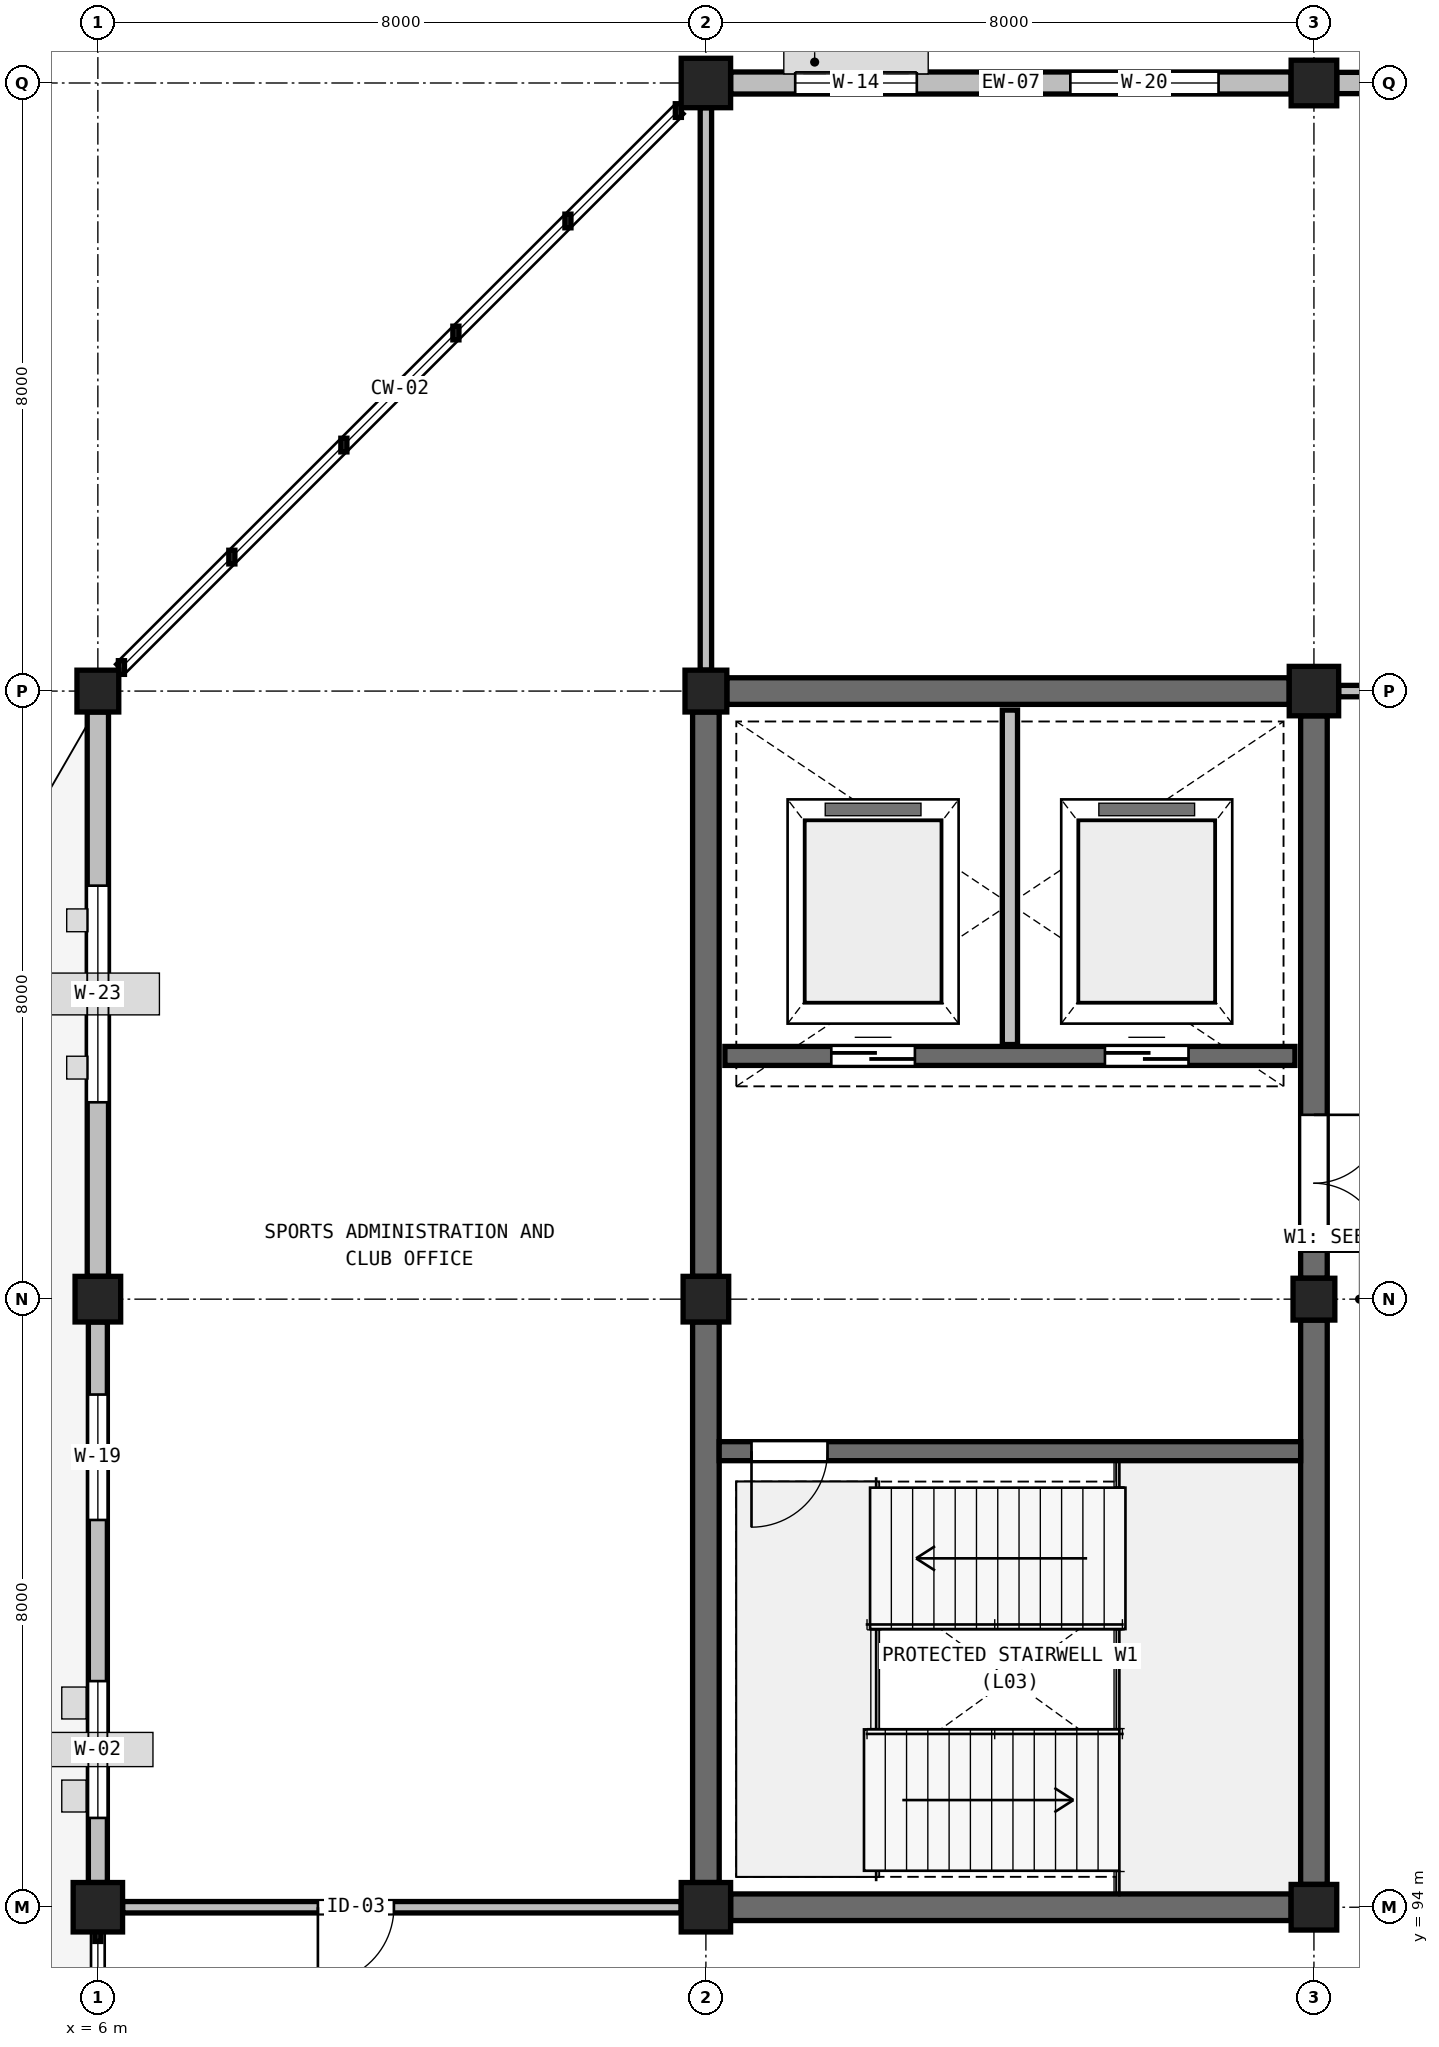
"""IFC4 building model, lengths in metres.
Left out: names, types, materials, properties, quantities, classifications, styles, units other than length and angle.
Written with IfcOpenShell. Run it as: python <this file> out.ifc"""

import sys

from ifc_helpers import new_model, si_unit, direction, frame, frame_2d, origin, origin_2d, place, context, subcontext, project, spatial, rectangle, extrude, element, fill, save


model = new_model("IFC4")
c1 = context("Model", 3, precision=1e-05, world=origin(), true_north=direction((0.0, 1.0)))
c2 = subcontext(c1, "Body", "Model", "MODEL_VIEW")
j1 = project(units=[si_unit("LENGTHUNIT", "METRE"), si_unit("PLANEANGLEUNIT", "RADIAN")], contexts=[c1])
p1 = place(None, origin())
s1 = spatial("IfcSite", under=j1, at=p1, CompositionType="ELEMENT")
p2 = place(p1, origin())
s2 = spatial("IfcBuilding", under=s1, at=p2, CompositionType="ELEMENT")
p3 = place(p2, frame((0.0, 0.0, 15.0)))
s3 = spatial("IfcBuildingStorey", under=s2, at=p3, CompositionType="ELEMENT", Elevation=15.0)
p4 = place(p3, frame((6.0, 94.0, 0.0), z_axis=(0.0, 0.0, 1.0), x_axis=(1.0, 0.0, 0.0)))
e1 = element("IfcColumn", 1, at=p4, inside=s3, PredefinedType="COLUMN", context=c2, shape_type="SweptSolid", body=[
    extrude(rectangle(XDim=0.65, YDim=0.65, at=origin_2d()), origin(), (0.0, 0.0, 1.0), 4.2),
])
p5 = place(p3, frame((6.0, 102.0, 0.0), z_axis=(0.0, 0.0, 1.0), x_axis=(1.0, 0.0, 0.0)))
e2 = element("IfcColumn", 2, at=p5, inside=s3, PredefinedType="COLUMN", context=c2, shape_type="SweptSolid", body=[
    extrude(rectangle(XDim=0.6, YDim=0.6, at=origin_2d()), origin(), (0.0, 0.0, 1.0), 4.2),
])
p6 = place(p3, frame((6.0, 110.0, 0.0), z_axis=(0.0, 0.0, 1.0), x_axis=(1.0, 0.0, 0.0)))
e3 = element("IfcColumn", 3, at=p6, inside=s3, PredefinedType="COLUMN", context=c2, shape_type="SweptSolid", body=[
    extrude(rectangle(XDim=0.55, YDim=0.55, at=origin_2d()), origin(), (0.0, 0.0, 1.0), 4.2),
])
p7 = place(p3, frame((14.0, 94.0, 0.0), z_axis=(0.0, 0.0, 1.0), x_axis=(1.0, 0.0, 0.0)))
e4 = element("IfcColumn", 4, at=p7, inside=s3, PredefinedType="COLUMN", context=c2, shape_type="SweptSolid", body=[
    extrude(rectangle(XDim=0.65, YDim=0.65, at=origin_2d()), origin(), (0.0, 0.0, 1.0), 4.2),
])
p8 = place(p3, frame((14.0, 102.0, 0.0), z_axis=(0.0, 0.0, 1.0), x_axis=(1.0, 0.0, 0.0)))
e5 = element("IfcColumn", 5, at=p8, inside=s3, PredefinedType="COLUMN", context=c2, shape_type="SweptSolid", body=[
    extrude(rectangle(XDim=0.6, YDim=0.6, at=origin_2d()), origin(), (0.0, 0.0, 1.0), 4.2),
])
p9 = place(p3, frame((14.0, 110.0, 0.0), z_axis=(0.0, 0.0, 1.0), x_axis=(1.0, 0.0, 0.0)))
e6 = element("IfcColumn", 6, at=p9, inside=s3, PredefinedType="COLUMN", context=c2, shape_type="SweptSolid", body=[
    extrude(rectangle(XDim=0.55, YDim=0.55, at=origin_2d()), origin(), (0.0, 0.0, 1.0), 4.2),
])
p10 = place(p3, frame((14.0, 118.0, 0.0), z_axis=(0.0, 0.0, 1.0), x_axis=(1.0, 0.0, 0.0)))
e7 = element("IfcColumn", 7, at=p10, inside=s3, PredefinedType="COLUMN", context=c2, shape_type="SweptSolid", body=[
    extrude(rectangle(XDim=0.65, YDim=0.65, at=origin_2d()), origin(), (0.0, 0.0, 1.0), 4.2),
])
p11 = place(p3, frame((22.0, 94.0, 0.0), z_axis=(0.0, 0.0, 1.0), x_axis=(1.0, 0.0, 0.0)))
e8 = element("IfcColumn", 8, at=p11, inside=s3, PredefinedType="COLUMN", context=c2, shape_type="SweptSolid", body=[
    extrude(rectangle(XDim=0.6, YDim=0.6, at=origin_2d()), origin(), (0.0, 0.0, 1.0), 4.2),
])
p12 = place(p3, frame((22.0, 102.0, 0.0), z_axis=(0.0, 0.0, 1.0), x_axis=(1.0, 0.0, 0.0)))
e9 = element("IfcColumn", 9, at=p12, inside=s3, PredefinedType="COLUMN", context=c2, shape_type="SweptSolid", body=[
    extrude(rectangle(XDim=0.55, YDim=0.55, at=origin_2d()), origin(), (0.0, 0.0, 1.0), 4.2),
])
p13 = place(p3, frame((22.0, 110.0, 0.0), z_axis=(0.0, 0.0, 1.0), x_axis=(1.0, 0.0, 0.0)))
e10 = element("IfcColumn", 10, at=p13, inside=s3, PredefinedType="COLUMN", context=c2, shape_type="SweptSolid", body=[
    extrude(rectangle(XDim=0.65, YDim=0.65, at=origin_2d()), origin(), (0.0, 0.0, 1.0), 4.2),
])
p14 = place(p3, frame((22.0, 118.0, 0.0), z_axis=(0.0, 0.0, 1.0), x_axis=(1.0, 0.0, 0.0)))
e11 = element("IfcColumn", 11, at=p14, inside=s3, PredefinedType="COLUMN", context=c2, shape_type="SweptSolid", body=[
    extrude(rectangle(XDim=0.6, YDim=0.6, at=origin_2d()), origin(), (0.0, 0.0, 1.0), 4.2),
])
p15 = place(p3, frame((14.325, 118.0, 0.0), z_axis=(0.0, 0.0, 1.0), x_axis=(1.0, 0.0, 0.0)))
e12 = element("IfcWall", 12, at=p15, inside=s3, PredefinedType="SOLIDWALL", context=c2, shape_type="SweptSolid", body=[
    extrude(rectangle(XDim=7.375, YDim=0.29, at=frame_2d((3.688, 0.0))), origin(), (0.0, 0.0, 1.0), 3.13),
])
p16 = place(p15, frame((0.85, 0.0, 0.55)))
e13 = element("IfcOpeningElement", 13, at=p16, cuts=e12, PredefinedType="OPENING", context=c2, shape_type="SweptSolid", body=[
    extrude(rectangle(XDim=1.6, YDim=2.0, at=frame_2d((0.8, 1.0))), frame((0.0, 0.155, 0.0), z_axis=(0.0, -1.0, 0.0), x_axis=(1.0, 0.0, 0.0)), (0.0, 0.0, 1.0), 0.31),
])
p17 = place(p15, frame((4.47, 0.0, 0.7)))
e14 = element("IfcOpeningElement", 14, at=p17, cuts=e12, PredefinedType="OPENING", context=c2, shape_type="SweptSolid", body=[
    extrude(rectangle(XDim=1.95, YDim=1.85, at=frame_2d((0.975, 0.925))), frame((0.0, 0.155, 0.0), z_axis=(0.0, -1.0, 0.0), x_axis=(1.0, 0.0, 0.0)), (0.0, 0.0, 1.0), 0.31),
])
p18 = place(p3, frame((22.3, 118.0, 0.0), z_axis=(0.0, 0.0, 1.0), x_axis=(1.0, 0.0, 0.0)))
e15 = element("IfcWall", 15, at=p18, inside=s3, PredefinedType="SOLIDWALL", context=c2, shape_type="SweptSolid", body=[
    extrude(rectangle(XDim=7.425, YDim=0.28, at=frame_2d((3.712, 0.0))), origin(), (0.0, 0.0, 1.0), 3.08),
])
p19 = place(p18, frame((1.31, 0.0, 1.15)))
e16 = element("IfcOpeningElement", 16, at=p19, cuts=e15, PredefinedType="OPENING", context=c2, shape_type="SweptSolid", body=[
    extrude(rectangle(XDim=4.8, YDim=1.4, at=frame_2d((2.4, 0.7))), frame((0.0, 0.15, 0.0), z_axis=(0.0, -1.0, 0.0), x_axis=(1.0, 0.0, 0.0)), (0.0, 0.0, 1.0), 0.3),
])
p20 = place(p3, frame((6.0, 94.325, 0.0), z_axis=(0.0, 0.0, 1.0), x_axis=(0.0, 1.0, 0.0)))
e17 = element("IfcWall", 17, at=p20, inside=s3, PredefinedType="SOLIDWALL", context=c2, shape_type="SweptSolid", body=[
    extrude(rectangle(XDim=7.375, YDim=0.25, at=frame_2d((3.688, 0.0))), origin(), (0.0, 0.0, 1.0), 3.38),
])
p21 = place(p20, frame((0.85, 0.0, 0.75)))
e18 = element("IfcOpeningElement", 18, at=p21, cuts=e17, PredefinedType="OPENING", context=c2, shape_type="SweptSolid", body=[
    extrude(rectangle(XDim=1.8, YDim=1.8, at=frame_2d((0.9, 0.9))), frame((0.0, 0.135, 0.0), z_axis=(0.0, -1.0, 0.0), x_axis=(1.0, 0.0, 0.0)), (0.0, 0.0, 1.0), 0.27),
])
p22 = place(p20, frame((4.77, 0.0, 0.7)))
e19 = element("IfcOpeningElement", 19, at=p22, cuts=e17, PredefinedType="OPENING", context=c2, shape_type="SweptSolid", body=[
    extrude(rectangle(XDim=1.65, YDim=1.85, at=frame_2d((0.825, 0.925))), frame((0.0, 0.135, 0.0), z_axis=(0.0, -1.0, 0.0), x_axis=(1.0, 0.0, 0.0)), (0.0, 0.0, 1.0), 0.27),
])
p23 = place(p3, frame((6.0, 102.3, 0.0), z_axis=(0.0, 0.0, 1.0), x_axis=(0.0, 1.0, 0.0)))
e20 = element("IfcWall", 20, at=p23, inside=s3, PredefinedType="SOLIDWALL", context=c2, shape_type="SweptSolid", body=[
    extrude(rectangle(XDim=7.425, YDim=0.28, at=frame_2d((3.712, 0.0))), origin(), (0.0, 0.0, 1.0), 3.28),
])
p24 = place(p23, frame((2.29, 0.0, 0.7)))
e21 = element("IfcOpeningElement", 21, at=p24, cuts=e20, PredefinedType="OPENING", context=c2, shape_type="SweptSolid", body=[
    extrude(rectangle(XDim=2.85, YDim=1.85, at=frame_2d((1.425, 0.925))), frame((0.0, 0.15, 0.0), z_axis=(0.0, -1.0, 0.0), x_axis=(1.0, 0.0, 0.0)), (0.0, 0.0, 1.0), 0.3),
])
p25 = place(p3, frame((14.325, 94.0, 0.0), z_axis=(0.0, 0.0, 1.0), x_axis=(1.0, 0.0, 0.0)))
e22 = element("IfcWall", 22, at=p25, inside=s3, PredefinedType="SHEAR", context=c2, shape_type="SweptSolid", body=[
    extrude(rectangle(XDim=7.375, YDim=0.35, at=frame_2d((3.688, 0.0))), origin(), (0.0, 0.0, 1.0), 3.98),
])
p26 = place(p3, frame((14.275, 110.0, 0.0), z_axis=(0.0, 0.0, 1.0), x_axis=(1.0, 0.0, 0.0)))
e23 = element("IfcWall", 23, at=p26, inside=s3, PredefinedType="SHEAR", context=c2, shape_type="SweptSolid", body=[
    extrude(rectangle(XDim=7.4, YDim=0.35, at=frame_2d((3.7, 0.0))), origin(), (0.0, 0.0, 1.0), 3.98),
])
p27 = place(p3, frame((14.0, 94.325, 0.0), z_axis=(0.0, 0.0, 1.0), x_axis=(0.0, 1.0, 0.0)))
e24 = element("IfcWall", 24, at=p27, inside=s3, PredefinedType="SHEAR", context=c2, shape_type="SweptSolid", body=[
    extrude(rectangle(XDim=7.375, YDim=0.35, at=frame_2d((3.688, 0.0))), origin(), (0.0, 0.0, 1.0), 3.98),
])
for number, where, z_axis, x_axis in (
    (25, (14.0, 102.3, 0.0), (0.0, 0.0, 1.0), (0.0, 1.0, 0.0)),
    (26, (22.0, 94.3, 0.0), (0.0, 0.0, 1.0), (0.0, 1.0, 0.0)),
):
    element("IfcWall", number, at=place(p3, frame(where, z_axis=z_axis, x_axis=x_axis)), inside=s3, PredefinedType="SHEAR", context=c2, shape_type="SweptSolid", body=[
        extrude(rectangle(XDim=7.425, YDim=0.35, at=frame_2d((3.712, 0.0))), origin(), (0.0, 0.0, 1.0), 3.98),
    ])
p28 = place(p3, frame((22.0, 102.275, 0.0), z_axis=(0.0, 0.0, 1.0), x_axis=(0.0, 1.0, 0.0)))
e27 = element("IfcWall", 27, at=p28, inside=s3, PredefinedType="SHEAR", context=c2, shape_type="SweptSolid", body=[
    extrude(rectangle(XDim=7.4, YDim=0.35, at=frame_2d((3.7, 0.0))), origin(), (0.0, 0.0, 1.0), 3.98),
])
p29 = place(p28, frame((0.35, 0.0, 0.0)))
e28 = element("IfcOpeningElement", 28, at=p29, cuts=e27, PredefinedType="OPENING", context=c2, shape_type="SweptSolid", body=[
    extrude(rectangle(XDim=1.8, YDim=2.2, at=frame_2d((0.9, 1.1))), frame((0.0, 0.185, 0.0), z_axis=(0.0, -1.0, 0.0), x_axis=(1.0, 0.0, 0.0)), (0.0, 0.0, 1.0), 0.37),
])
p30 = place(p3, frame((14.175, 100.0, 0.0), z_axis=(0.0, 0.0, 1.0), x_axis=(1.0, 0.0, 0.0)))
e29 = element("IfcWall", 29, at=p30, inside=s3, PredefinedType="SOLIDWALL", context=c2, shape_type="SweptSolid", body=[
    extrude(rectangle(XDim=7.65, YDim=0.25, at=frame_2d((3.825, 0.0))), origin(), (0.0, 0.0, 1.0), 3.98),
])
p31 = place(p30, frame((0.425, 0.0, 0.0)))
e30 = element("IfcOpeningElement", 30, at=p31, cuts=e29, PredefinedType="OPENING", context=c2, shape_type="SweptSolid", body=[
    extrude(rectangle(XDim=1.0, YDim=2.2, at=frame_2d((0.5, 1.1))), frame((0.0, 0.135, 0.0), z_axis=(0.0, -1.0, 0.0), x_axis=(1.0, 0.0, 0.0)), (0.0, 0.0, 1.0), 0.27),
])
p32 = place(p3, frame((14.25, 105.2, 0.0), z_axis=(0.0, 0.0, 1.0), x_axis=(1.0, 0.0, 0.0)))
e31 = element("IfcWall", 31, at=p32, inside=s3, PredefinedType="SOLIDWALL", context=c2, shape_type="SweptSolid", body=[
    extrude(rectangle(XDim=7.5, YDim=0.25, at=frame_2d((3.75, 0.0))), origin(), (0.0, 0.0, 1.0), 3.98),
])
p33 = place(p32, frame((1.4, 0.0, 0.0)))
e32 = element("IfcOpeningElement", 32, at=p33, cuts=e31, PredefinedType="OPENING", context=c2, shape_type="SweptSolid", body=[
    extrude(rectangle(XDim=1.1, YDim=2.2, at=frame_2d((0.55, 1.1))), frame((0.0, 0.135, 0.0), z_axis=(0.0, -1.0, 0.0), x_axis=(1.0, 0.0, 0.0)), (0.0, 0.0, 1.0), 0.27),
])
p34 = place(p32, frame((5.0, 0.0, 0.0)))
e33 = element("IfcOpeningElement", 33, at=p34, cuts=e31, PredefinedType="OPENING", context=c2, shape_type="SweptSolid", body=[
    extrude(rectangle(XDim=1.1, YDim=2.2, at=frame_2d((0.55, 1.1))), frame((0.0, 0.135, 0.0), z_axis=(0.0, -1.0, 0.0), x_axis=(1.0, 0.0, 0.0)), (0.0, 0.0, 1.0), 0.27),
])
p35 = place(p3, frame((18.0, 105.35, 0.0), z_axis=(0.0, 0.0, 1.0), x_axis=(0.0, 1.0, 0.0)))
e34 = element("IfcWall", 34, at=p35, inside=s3, PredefinedType="PARTITIONING", context=c2, shape_type="SweptSolid", body=[
    extrude(rectangle(XDim=4.4, YDim=0.2, at=frame_2d((2.2, 0.0))), origin(), (0.0, 0.0, 1.0), 3.9),
])
p36 = place(p3, frame((6.325, 94.0, 0.0), z_axis=(0.0, 0.0, 1.0), x_axis=(1.0, 0.0, 0.0)))
e35 = element("IfcWall", 35, at=p36, inside=s3, PredefinedType="PARTITIONING", context=c2, shape_type="SweptSolid", body=[
    extrude(rectangle(XDim=7.35, YDim=0.15, at=frame_2d((3.675, 0.0))), origin(), (0.0, 0.0, 1.0), 3.43),
])
p37 = place(p36, frame((2.57, 0.0, 0.0)))
e36 = element("IfcOpeningElement", 36, at=p37, cuts=e35, PredefinedType="OPENING", context=c2, shape_type="SweptSolid", body=[
    extrude(rectangle(XDim=1.0, YDim=2.15, at=frame_2d((0.5, 1.075))), frame((0.0, 0.085, 0.0), z_axis=(0.0, -1.0, 0.0), x_axis=(1.0, 0.0, 0.0)), (0.0, 0.0, 1.0), 0.17),
])
p38 = place(p3, frame((14.0, 110.275, 0.0), z_axis=(0.0, 0.0, 1.0), x_axis=(0.0, 1.0, 0.0)))
e37 = element("IfcWall", 37, at=p38, inside=s3, PredefinedType="PARTITIONING", context=c2, shape_type="SweptSolid", body=[
    extrude(rectangle(XDim=7.4, YDim=0.15, at=frame_2d((3.7, 0.0))), origin(), (0.0, 0.0, 1.0), 3.23),
])
p39 = place(p3, frame((22.325, 110.0, 0.0), z_axis=(0.0, 0.0, 1.0), x_axis=(1.0, 0.0, 0.0)))
e38 = element("IfcWall", 38, at=p39, inside=s3, PredefinedType="PARTITIONING", context=c2, shape_type="SweptSolid", body=[
    extrude(rectangle(XDim=7.375, YDim=0.15, at=frame_2d((3.688, 0.0))), origin(), (0.0, 0.0, 1.0), 3.28),
])
p40 = place(p39, frame((2.58, 0.0, 0.0)))
e39 = element("IfcOpeningElement", 39, at=p40, cuts=e38, PredefinedType="OPENING", context=c2, shape_type="SweptSolid", body=[
    extrude(rectangle(XDim=1.7, YDim=2.25, at=frame_2d((0.85, 1.125))), frame((0.0, 0.085, 0.0), z_axis=(0.0, -1.0, 0.0), x_axis=(1.0, 0.0, 0.0)), (0.0, 0.0, 1.0), 0.17),
])
p41 = place(p16, origin())
e40 = element("IfcWindow", 40, at=p41, inside=s3, PartitioningType="SINGLE_PANEL", PredefinedType="WINDOW", context=c2, shape_type="SweptSolid", body=[
    extrude(rectangle(XDim=1.6, YDim=2.0, at=frame_2d((0.8, 1.0))), frame((0.0, 0.03, 0.0), z_axis=(0.0, -1.0, 0.0), x_axis=(1.0, 0.0, 0.0)), (0.0, 0.0, 1.0), 0.06),
])
fill(e13, e40)
p42 = place(p17, origin())
e41 = element("IfcWindow", 41, at=p42, inside=s3, PartitioningType="SINGLE_PANEL", PredefinedType="WINDOW", context=c2, shape_type="SweptSolid", body=[
    extrude(rectangle(XDim=1.95, YDim=1.85, at=frame_2d((0.975, 0.925))), frame((0.0, 0.03, 0.0), z_axis=(0.0, -1.0, 0.0), x_axis=(1.0, 0.0, 0.0)), (0.0, 0.0, 1.0), 0.06),
])
fill(e14, e41)
p43 = place(p21, origin())
e42 = element("IfcWindow", 42, at=p43, inside=s3, PartitioningType="SINGLE_PANEL", PredefinedType="WINDOW", context=c2, shape_type="SweptSolid", body=[
    extrude(rectangle(XDim=1.8, YDim=1.8, at=frame_2d((0.9, 0.9))), frame((0.0, 0.03, 0.0), z_axis=(0.0, -1.0, 0.0), x_axis=(1.0, 0.0, 0.0)), (0.0, 0.0, 1.0), 0.06),
])
fill(e18, e42)
p44 = place(p22, origin())
e43 = element("IfcWindow", 43, at=p44, inside=s3, PartitioningType="SINGLE_PANEL", PredefinedType="WINDOW", context=c2, shape_type="SweptSolid", body=[
    extrude(rectangle(XDim=1.65, YDim=1.85, at=frame_2d((0.825, 0.925))), frame((0.0, 0.03, 0.0), z_axis=(0.0, -1.0, 0.0), x_axis=(1.0, 0.0, 0.0)), (0.0, 0.0, 1.0), 0.06),
])
fill(e19, e43)
p45 = place(p24, origin())
e44 = element("IfcWindow", 44, at=p45, inside=s3, PartitioningType="SINGLE_PANEL", PredefinedType="WINDOW", context=c2, shape_type="SweptSolid", body=[
    extrude(rectangle(XDim=2.85, YDim=1.85, at=frame_2d((1.425, 0.925))), frame((0.0, 0.03, 0.0), z_axis=(0.0, -1.0, 0.0), x_axis=(1.0, 0.0, 0.0)), (0.0, 0.0, 1.0), 0.06),
])
fill(e21, e44)
p46 = place(p29, frame((1.8, 0.0, 0.0), z_axis=(0.0, 0.0, 1.0), x_axis=(-1.0, 0.0, 0.0)))
e45 = element("IfcDoor", 45, at=p46, inside=s3, OperationType="DOUBLE_DOOR_SINGLE_SWING", PredefinedType="DOOR", context=c2, shape_type="SweptSolid", body=[
    extrude(rectangle(XDim=1.8, YDim=2.2, at=frame_2d((0.9, 1.1))), frame((0.0, 0.025, 0.0), z_axis=(0.0, -1.0, 0.0), x_axis=(1.0, 0.0, 0.0)), (0.0, 0.0, 1.0), 0.05),
])
fill(e28, e45)
p47 = place(p31, frame((1.0, 0.0, 0.0), z_axis=(0.0, 0.0, 1.0), x_axis=(-1.0, 0.0, 0.0)))
e46 = element("IfcDoor", 46, at=p47, inside=s3, OperationType="SINGLE_SWING_LEFT", PredefinedType="DOOR", context=c2, shape_type="SweptSolid", body=[
    extrude(rectangle(XDim=1.0, YDim=2.2, at=frame_2d((0.5, 1.1))), frame((0.0, 0.025, 0.0), z_axis=(0.0, -1.0, 0.0), x_axis=(1.0, 0.0, 0.0)), (0.0, 0.0, 1.0), 0.05),
])
fill(e30, e46)
p48 = place(p33, origin())
e47 = element("IfcDoor", 47, at=p48, inside=s3, OperationType="DOUBLE_DOOR_SLIDING", PredefinedType="DOOR", context=c2, shape_type="SweptSolid", body=[
    extrude(rectangle(XDim=1.1, YDim=2.2, at=frame_2d((0.55, 1.1))), frame((0.0, 0.025, 0.0), z_axis=(0.0, -1.0, 0.0), x_axis=(1.0, 0.0, 0.0)), (0.0, 0.0, 1.0), 0.05),
])
fill(e32, e47)
p49 = place(p34, origin())
e48 = element("IfcDoor", 48, at=p49, inside=s3, OperationType="DOUBLE_DOOR_SLIDING", PredefinedType="DOOR", context=c2, shape_type="SweptSolid", body=[
    extrude(rectangle(XDim=1.1, YDim=2.2, at=frame_2d((0.55, 1.1))), frame((0.0, 0.025, 0.0), z_axis=(0.0, -1.0, 0.0), x_axis=(1.0, 0.0, 0.0)), (0.0, 0.0, 1.0), 0.05),
])
fill(e33, e48)
p50 = place(p37, frame((1.0, 0.0, 0.0), z_axis=(0.0, 0.0, 1.0), x_axis=(-1.0, 0.0, 0.0)))
e49 = element("IfcDoor", 49, at=p50, inside=s3, OperationType="SINGLE_SWING_LEFT", PredefinedType="DOOR", context=c2, shape_type="SweptSolid", body=[
    extrude(rectangle(XDim=1.0, YDim=2.15, at=frame_2d((0.5, 1.075))), frame((0.0, 0.025, 0.0), z_axis=(0.0, -1.0, 0.0), x_axis=(1.0, 0.0, 0.0)), (0.0, 0.0, 1.0), 0.05),
])
fill(e36, e49)
save(model, sys.argv[1])
